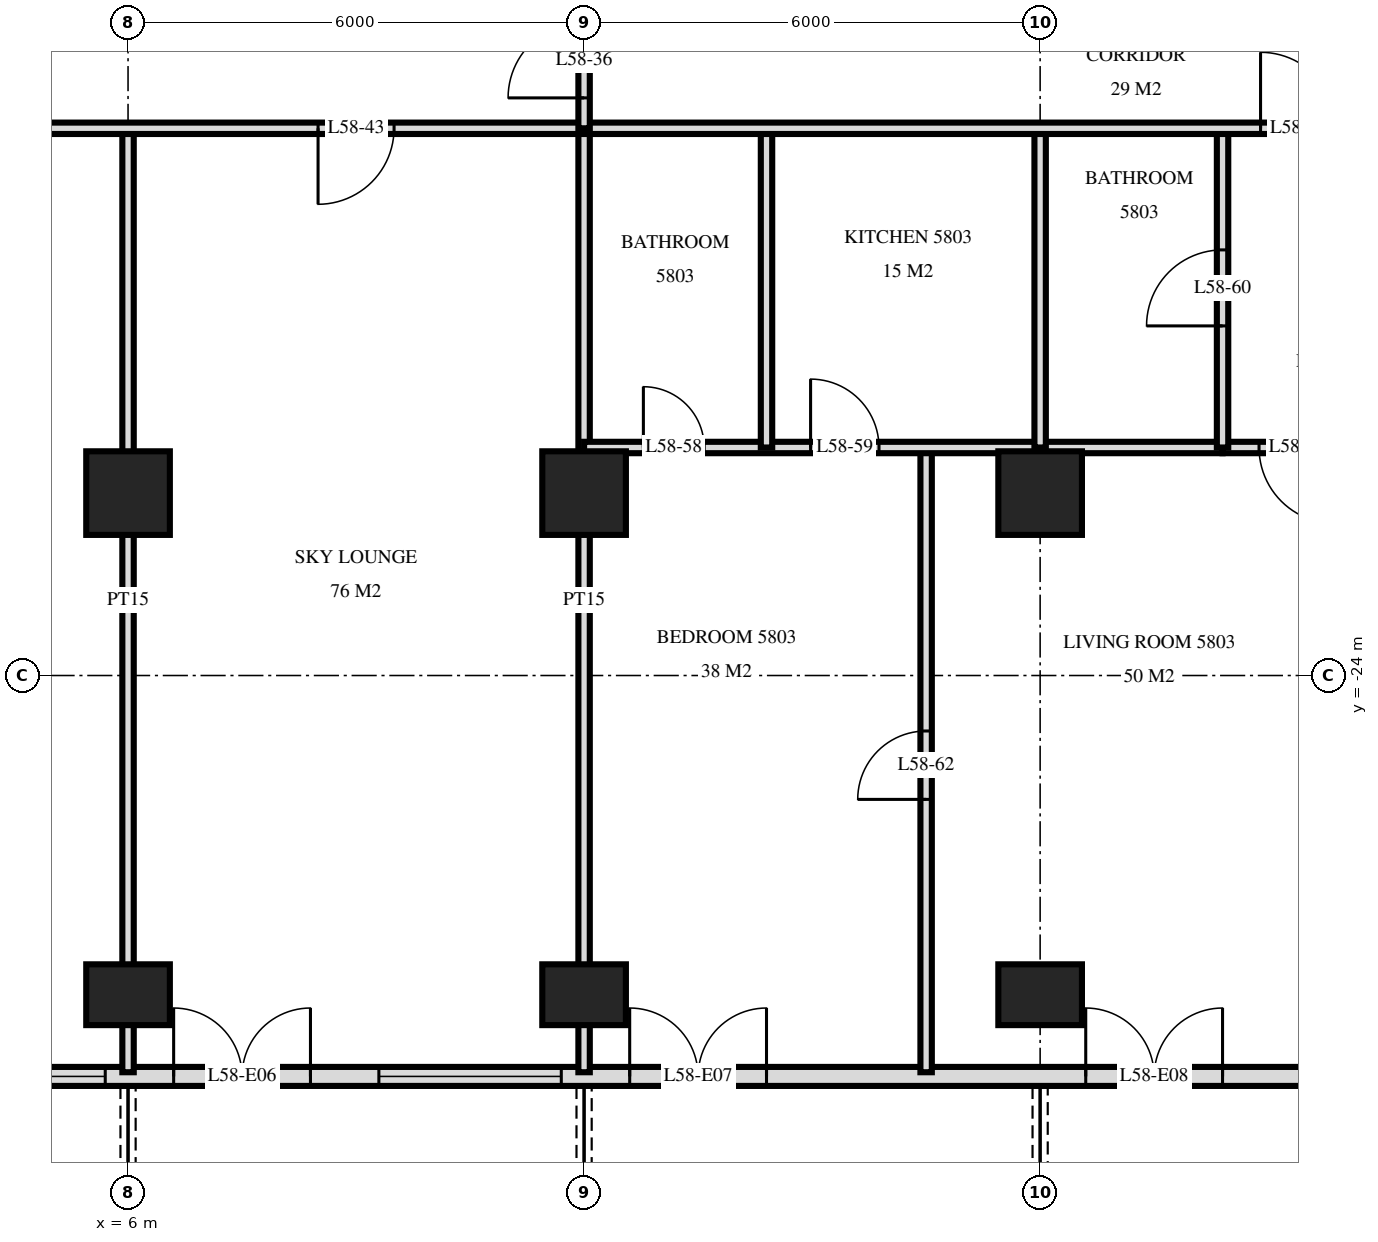
"""IFC4 building model, lengths in metres.
Left out: names, types, materials, properties, quantities, classifications, styles, units other than length and angle.
Written with IfcOpenShell. Run it as: python <this file> out.ifc"""

import sys

from ifc_helpers import new_model, si_unit, direction, frame, frame_2d, origin, origin_2d, place, context, subcontext, project, spatial, rectangle, extrude, element, fill, save


model = new_model("IFC4")
c1 = context("Model", 3, precision=1e-05, world=origin(), true_north=direction((0.0, 1.0)))
c2 = subcontext(c1, "Body", "Model", "MODEL_VIEW")
j1 = project(units=[si_unit("LENGTHUNIT", "METRE"), si_unit("PLANEANGLEUNIT", "RADIAN")], contexts=[c1])
p1 = place(None, origin())
s1 = spatial("IfcSite", under=j1, at=p1, CompositionType="ELEMENT")
p2 = place(p1, origin())
s2 = spatial("IfcBuilding", under=s1, at=p2, CompositionType="ELEMENT")
p3 = place(p2, frame((0.0, 0.0, 222.1)))
s3 = spatial("IfcBuildingStorey", under=s2, at=p3, CompositionType="ELEMENT", Elevation=222.1)
p4 = place(p3, frame((6.0, -28.2, 0.0), z_axis=(0.0, 0.0, 1.0), x_axis=(1.0, 0.0, 0.0)))
e1 = element("IfcColumn", 1, at=p4, inside=s3, PredefinedType="COLUMN", context=c2, shape_type="SweptSolid", body=[
    extrude(rectangle(XDim=1.1, YDim=0.8, at=origin_2d()), origin(), (0.0, 0.0, 1.0), 3.5),
])
p5 = place(p3, frame((6.0, -21.6, 0.0), z_axis=(0.0, 0.0, 1.0), x_axis=(1.0, 0.0, 0.0)))
e2 = element("IfcColumn", 2, at=p5, inside=s3, PredefinedType="COLUMN", context=c2, shape_type="SweptSolid", body=[
    extrude(rectangle(XDim=1.1, YDim=1.1, at=origin_2d()), origin(), (0.0, 0.0, 1.0), 3.5),
])
p6 = place(p3, frame((12.0, -28.2, 0.0), z_axis=(0.0, 0.0, 1.0), x_axis=(1.0, 0.0, 0.0)))
e3 = element("IfcColumn", 3, at=p6, inside=s3, PredefinedType="COLUMN", context=c2, shape_type="SweptSolid", body=[
    extrude(rectangle(XDim=1.1, YDim=0.8, at=origin_2d()), origin(), (0.0, 0.0, 1.0), 3.5),
])
p7 = place(p3, frame((12.0, -21.6, 0.0), z_axis=(0.0, 0.0, 1.0), x_axis=(1.0, 0.0, 0.0)))
e4 = element("IfcColumn", 4, at=p7, inside=s3, PredefinedType="COLUMN", context=c2, shape_type="SweptSolid", body=[
    extrude(rectangle(XDim=1.1, YDim=1.1, at=origin_2d()), origin(), (0.0, 0.0, 1.0), 3.5),
])
p8 = place(p3, frame((18.0, -28.2, 0.0), z_axis=(0.0, 0.0, 1.0), x_axis=(1.0, 0.0, 0.0)))
e5 = element("IfcColumn", 5, at=p8, inside=s3, PredefinedType="COLUMN", context=c2, shape_type="SweptSolid", body=[
    extrude(rectangle(XDim=1.1, YDim=0.8, at=origin_2d()), origin(), (0.0, 0.0, 1.0), 3.5),
])
p9 = place(p3, frame((18.0, -21.6, 0.0), z_axis=(0.0, 0.0, 1.0), x_axis=(1.0, 0.0, 0.0)))
e6 = element("IfcColumn", 6, at=p9, inside=s3, PredefinedType="COLUMN", context=c2, shape_type="SweptSolid", body=[
    extrude(rectangle(XDim=1.1, YDim=1.1, at=origin_2d()), origin(), (0.0, 0.0, 1.0), 3.5),
])
p10 = place(p3, frame((-22.475, -29.275, 0.0), z_axis=(0.0, 0.0, 1.0), x_axis=(1.0, 0.0, 0.0)))
e7 = element("IfcWall", 7, at=p10, inside=s3, PredefinedType="SOLIDWALL", context=c2, shape_type="SweptSolid", body=[
    extrude(rectangle(XDim=44.951, YDim=0.25, at=frame_2d((22.475, 0.0))), origin(), (0.0, 0.0, 1.0), 3.22),
])
p11 = place(p10, frame((0.575, 0.0, 0.0)))
e8 = element("IfcOpeningElement", 8, at=p11, cuts=e7, PredefinedType="OPENING", context=c2, shape_type="SweptSolid", body=[
    extrude(rectangle(XDim=1.8, YDim=2.4, at=frame_2d((0.9, 1.2))), frame((0.0, 0.135, 0.0), z_axis=(0.0, -1.0, 0.0), x_axis=(1.0, 0.0, 0.0)), (0.0, 0.0, 1.0), 0.27),
])
p12 = place(p10, frame((4.775, 0.0, 0.9)))
e9 = element("IfcOpeningElement", 9, at=p12, cuts=e7, PredefinedType="OPENING", context=c2, shape_type="SweptSolid", body=[
    extrude(rectangle(XDim=2.4, YDim=1.5, at=frame_2d((1.2, 0.75))), frame((0.0, 0.135, 0.0), z_axis=(0.0, -1.0, 0.0), x_axis=(1.0, 0.0, 0.0)), (0.0, 0.0, 1.0), 0.27),
])
p13 = place(p10, frame((8.075, 0.0, 0.0)))
e10 = element("IfcOpeningElement", 10, at=p13, cuts=e7, PredefinedType="OPENING", context=c2, shape_type="SweptSolid", body=[
    extrude(rectangle(XDim=1.8, YDim=2.4, at=frame_2d((0.9, 1.2))), frame((0.0, 0.135, 0.0), z_axis=(0.0, -1.0, 0.0), x_axis=(1.0, 0.0, 0.0)), (0.0, 0.0, 1.0), 0.27),
])
p14 = place(p10, frame((11.075, 0.0, 0.0)))
e11 = element("IfcOpeningElement", 11, at=p14, cuts=e7, PredefinedType="OPENING", context=c2, shape_type="SweptSolid", body=[
    extrude(rectangle(XDim=1.8, YDim=2.4, at=frame_2d((0.9, 1.2))), frame((0.0, 0.135, 0.0), z_axis=(0.0, -1.0, 0.0), x_axis=(1.0, 0.0, 0.0)), (0.0, 0.0, 1.0), 0.27),
])
p15 = place(p10, frame((13.775, 0.0, 0.9)))
e12 = element("IfcOpeningElement", 12, at=p15, cuts=e7, PredefinedType="OPENING", context=c2, shape_type="SweptSolid", body=[
    extrude(rectangle(XDim=2.4, YDim=1.5, at=frame_2d((1.2, 0.75))), frame((0.0, 0.135, 0.0), z_axis=(0.0, -1.0, 0.0), x_axis=(1.0, 0.0, 0.0)), (0.0, 0.0, 1.0), 0.27),
])
p16 = place(p10, frame((16.775, 0.0, 0.9)))
e13 = element("IfcOpeningElement", 13, at=p16, cuts=e7, PredefinedType="OPENING", context=c2, shape_type="SweptSolid", body=[
    extrude(rectangle(XDim=2.4, YDim=1.5, at=frame_2d((1.2, 0.75))), frame((0.0, 0.135, 0.0), z_axis=(0.0, -1.0, 0.0), x_axis=(1.0, 0.0, 0.0)), (0.0, 0.0, 1.0), 0.27),
])
p17 = place(p10, frame((20.075, 0.0, 0.0)))
e14 = element("IfcOpeningElement", 14, at=p17, cuts=e7, PredefinedType="OPENING", context=c2, shape_type="SweptSolid", body=[
    extrude(rectangle(XDim=1.8, YDim=2.4, at=frame_2d((0.9, 1.2))), frame((0.0, 0.135, 0.0), z_axis=(0.0, -1.0, 0.0), x_axis=(1.0, 0.0, 0.0)), (0.0, 0.0, 1.0), 0.27),
])
p18 = place(p10, frame((23.075, 0.0, 0.0)))
e15 = element("IfcOpeningElement", 15, at=p18, cuts=e7, PredefinedType="OPENING", context=c2, shape_type="SweptSolid", body=[
    extrude(rectangle(XDim=1.8, YDim=2.4, at=frame_2d((0.9, 1.2))), frame((0.0, 0.135, 0.0), z_axis=(0.0, -1.0, 0.0), x_axis=(1.0, 0.0, 0.0)), (0.0, 0.0, 1.0), 0.27),
])
p19 = place(p10, frame((25.775, 0.0, 0.9)))
e16 = element("IfcOpeningElement", 16, at=p19, cuts=e7, PredefinedType="OPENING", context=c2, shape_type="SweptSolid", body=[
    extrude(rectangle(XDim=2.4, YDim=1.5, at=frame_2d((1.2, 0.75))), frame((0.0, 0.135, 0.0), z_axis=(0.0, -1.0, 0.0), x_axis=(1.0, 0.0, 0.0)), (0.0, 0.0, 1.0), 0.27),
])
p20 = place(p10, frame((29.075, 0.0, 0.0)))
e17 = element("IfcOpeningElement", 17, at=p20, cuts=e7, PredefinedType="OPENING", context=c2, shape_type="SweptSolid", body=[
    extrude(rectangle(XDim=1.8, YDim=2.4, at=frame_2d((0.9, 1.2))), frame((0.0, 0.135, 0.0), z_axis=(0.0, -1.0, 0.0), x_axis=(1.0, 0.0, 0.0)), (0.0, 0.0, 1.0), 0.27),
])
p21 = place(p10, frame((31.775, 0.0, 0.9)))
e18 = element("IfcOpeningElement", 18, at=p21, cuts=e7, PredefinedType="OPENING", context=c2, shape_type="SweptSolid", body=[
    extrude(rectangle(XDim=2.4, YDim=1.5, at=frame_2d((1.2, 0.75))), frame((0.0, 0.135, 0.0), z_axis=(0.0, -1.0, 0.0), x_axis=(1.0, 0.0, 0.0)), (0.0, 0.0, 1.0), 0.27),
])
p22 = place(p10, frame((35.075, 0.0, 0.0)))
e19 = element("IfcOpeningElement", 19, at=p22, cuts=e7, PredefinedType="OPENING", context=c2, shape_type="SweptSolid", body=[
    extrude(rectangle(XDim=1.8, YDim=2.4, at=frame_2d((0.9, 1.2))), frame((0.0, 0.135, 0.0), z_axis=(0.0, -1.0, 0.0), x_axis=(1.0, 0.0, 0.0)), (0.0, 0.0, 1.0), 0.27),
])
p23 = place(p10, frame((41.075, 0.0, 0.0)))
e20 = element("IfcOpeningElement", 20, at=p23, cuts=e7, PredefinedType="OPENING", context=c2, shape_type="SweptSolid", body=[
    extrude(rectangle(XDim=1.8, YDim=2.4, at=frame_2d((0.9, 1.2))), frame((0.0, 0.135, 0.0), z_axis=(0.0, -1.0, 0.0), x_axis=(1.0, 0.0, 0.0)), (0.0, 0.0, 1.0), 0.27),
])
p24 = place(p3, frame((20.4, -21.0, 0.0), z_axis=(0.0, 0.0, 1.0), x_axis=(0.0, 1.0, 0.0)))
e21 = element("IfcWall", 21, at=p24, inside=s3, PredefinedType="PARTITIONING", context=c2, shape_type="SweptSolid", body=[
    extrude(rectangle(XDim=4.2, YDim=0.15, at=frame_2d((2.1, 0.0))), origin(), (0.0, 0.0, 1.0), 3.22),
])
p25 = place(p24, frame((1.6, 0.0, 0.0)))
e22 = element("IfcOpeningElement", 22, at=p25, cuts=e21, PredefinedType="OPENING", context=c2, shape_type="SweptSolid", body=[
    extrude(rectangle(XDim=1.0, YDim=2.1, at=frame_2d((0.5, 1.05))), frame((0.0, 0.085, 0.0), z_axis=(0.0, -1.0, 0.0), x_axis=(1.0, 0.0, 0.0)), (0.0, 0.0, 1.0), 0.17),
])
p26 = place(p3, frame((18.0, -21.0, 0.0), z_axis=(0.0, 0.0, 1.0), x_axis=(0.0, 1.0, 0.0)))
e23 = element("IfcWall", 23, at=p26, inside=s3, PredefinedType="PARTITIONING", context=c2, shape_type="SweptSolid", body=[
    extrude(rectangle(XDim=4.2, YDim=0.15, at=frame_2d((2.1, 0.0))), origin(), (0.0, 0.0, 1.0), 3.22),
])
p27 = place(p3, frame((16.5, -29.22, 0.0), z_axis=(0.0, 0.0, 1.0), x_axis=(0.0, 1.0, 0.0)))
e24 = element("IfcWall", 24, at=p27, inside=s3, PredefinedType="PARTITIONING", context=c2, shape_type="SweptSolid", body=[
    extrude(rectangle(XDim=8.22, YDim=0.15, at=frame_2d((4.11, 0.0))), origin(), (0.0, 0.0, 1.0), 3.22),
])
p28 = place(p27, frame((3.59, 0.0, 0.0)))
e25 = element("IfcOpeningElement", 25, at=p28, cuts=e24, PredefinedType="OPENING", context=c2, shape_type="SweptSolid", body=[
    extrude(rectangle(XDim=0.9, YDim=2.1, at=frame_2d((0.45, 1.05))), frame((0.0, 0.085, 0.0), z_axis=(0.0, -1.0, 0.0), x_axis=(1.0, 0.0, 0.0)), (0.0, 0.0, 1.0), 0.17),
])
p29 = place(p3, frame((14.4, -21.0, 0.0), z_axis=(0.0, 0.0, 1.0), x_axis=(0.0, 1.0, 0.0)))
e26 = element("IfcWall", 26, at=p29, inside=s3, PredefinedType="PARTITIONING", context=c2, shape_type="SweptSolid", body=[
    extrude(rectangle(XDim=4.2, YDim=0.15, at=frame_2d((2.1, 0.0))), origin(), (0.0, 0.0, 1.0), 3.22),
])
p30 = place(p3, frame((12.0, -16.8, 0.0), z_axis=(0.0, 0.0, 1.0), x_axis=(0.0, 1.0, 0.0)))
e27 = element("IfcWall", 27, at=p30, inside=s3, PredefinedType="PARTITIONING", context=c2, shape_type="SweptSolid", body=[
    extrude(rectangle(XDim=1.75, YDim=0.15, at=frame_2d((0.875, 0.0))), origin(), (0.0, 0.0, 1.0), 3.22),
])
p31 = place(p30, frame((0.4, 0.0, 0.0)))
e28 = element("IfcOpeningElement", 28, at=p31, cuts=e27, PredefinedType="OPENING", context=c2, shape_type="SweptSolid", body=[
    extrude(rectangle(XDim=1.0, YDim=2.1, at=frame_2d((0.5, 1.05))), frame((0.0, 0.085, 0.0), z_axis=(0.0, -1.0, 0.0), x_axis=(1.0, 0.0, 0.0)), (0.0, 0.0, 1.0), 0.17),
])
for number, where, z_axis, x_axis in (
    (29, (12.0, -29.22, 0.0), (0.0, 0.0, 1.0), (0.0, 1.0, 0.0)),
    (30, (6.0, -29.22, 0.0), (0.0, 0.0, 1.0), (0.0, 1.0, 0.0)),
):
    element("IfcWall", number, at=place(p3, frame(where, z_axis=z_axis, x_axis=x_axis)), inside=s3, PredefinedType="PARTITIONING", context=c2, shape_type="SweptSolid", body=[
        extrude(rectangle(XDim=12.42, YDim=0.15, at=frame_2d((6.21, 0.0))), origin(), (0.0, 0.0, 1.0), 3.22),
    ])
p32 = place(p3, frame((20.4, -21.0, 0.0), z_axis=(0.0, 0.0, 1.0), x_axis=(1.0, 0.0, 0.0)))
e31 = element("IfcWall", 31, at=p32, inside=s3, PredefinedType="PARTITIONING", context=c2, shape_type="SweptSolid", body=[
    extrude(rectangle(XDim=2.0, YDim=0.15, at=frame_2d((1.0, 0.0))), origin(), (0.0, 0.0, 1.0), 3.22),
])
p33 = place(p32, frame((0.48, 0.0, 0.0)))
e32 = element("IfcOpeningElement", 32, at=p33, cuts=e31, PredefinedType="OPENING", context=c2, shape_type="SweptSolid", body=[
    extrude(rectangle(XDim=1.0, YDim=2.1, at=frame_2d((0.5, 1.05))), frame((0.0, 0.085, 0.0), z_axis=(0.0, -1.0, 0.0), x_axis=(1.0, 0.0, 0.0)), (0.0, 0.0, 1.0), 0.17),
])
p34 = place(p3, frame((12.0, -21.0, 0.0), z_axis=(0.0, 0.0, 1.0), x_axis=(1.0, 0.0, 0.0)))
e33 = element("IfcWall", 33, at=p34, inside=s3, PredefinedType="PARTITIONING", context=c2, shape_type="SweptSolid", body=[
    extrude(rectangle(XDim=8.4, YDim=0.15, at=frame_2d((4.2, 0.0))), origin(), (0.0, 0.0, 1.0), 3.22),
])
p35 = place(p34, frame((0.78, 0.0, 0.0)))
e34 = element("IfcOpeningElement", 34, at=p35, cuts=e33, PredefinedType="OPENING", context=c2, shape_type="SweptSolid", body=[
    extrude(rectangle(XDim=0.8, YDim=2.1, at=frame_2d((0.4, 1.05))), frame((0.0, 0.085, 0.0), z_axis=(0.0, -1.0, 0.0), x_axis=(1.0, 0.0, 0.0)), (0.0, 0.0, 1.0), 0.17),
])
p36 = place(p34, frame((2.98, 0.0, 0.0)))
e35 = element("IfcOpeningElement", 35, at=p36, cuts=e33, PredefinedType="OPENING", context=c2, shape_type="SweptSolid", body=[
    extrude(rectangle(XDim=0.9, YDim=2.1, at=frame_2d((0.45, 1.05))), frame((0.0, 0.085, 0.0), z_axis=(0.0, -1.0, 0.0), x_axis=(1.0, 0.0, 0.0)), (0.0, 0.0, 1.0), 0.17),
])
p37 = place(p3, frame((-26.82, -16.8, 0.0), z_axis=(0.0, 0.0, 1.0), x_axis=(1.0, 0.0, 0.0)))
e36 = element("IfcWall", 36, at=p37, inside=s3, PredefinedType="PARTITIONING", context=c2, shape_type="SweptSolid", body=[
    extrude(rectangle(XDim=53.64, YDim=0.15, at=frame_2d((26.82, 0.0))), origin(), (0.0, 0.0, 1.0), 3.22),
])
p38 = place(p37, frame((11.17, 0.0, 0.0)))
e37 = element("IfcOpeningElement", 37, at=p38, cuts=e36, PredefinedType="OPENING", context=c2, shape_type="SweptSolid", body=[
    extrude(rectangle(XDim=1.0, YDim=2.1, at=frame_2d((0.5, 1.05))), frame((0.0, 0.085, 0.0), z_axis=(0.0, -1.0, 0.0), x_axis=(1.0, 0.0, 0.0)), (0.0, 0.0, 1.0), 0.17),
])
p39 = place(p37, frame((3.22, 0.0, 0.0)))
e38 = element("IfcOpeningElement", 38, at=p39, cuts=e36, PredefinedType="OPENING", context=c2, shape_type="SweptSolid", body=[
    extrude(rectangle(XDim=1.0, YDim=2.1, at=frame_2d((0.5, 1.05))), frame((0.0, 0.085, 0.0), z_axis=(0.0, -1.0, 0.0), x_axis=(1.0, 0.0, 0.0)), (0.0, 0.0, 1.0), 0.17),
])
p40 = place(p37, frame((5.02, 0.0, 0.0)))
e39 = element("IfcOpeningElement", 39, at=p40, cuts=e36, PredefinedType="OPENING", context=c2, shape_type="SweptSolid", body=[
    extrude(rectangle(XDim=1.0, YDim=2.1, at=frame_2d((0.5, 1.05))), frame((0.0, 0.085, 0.0), z_axis=(0.0, -1.0, 0.0), x_axis=(1.0, 0.0, 0.0)), (0.0, 0.0, 1.0), 0.17),
])
p41 = place(p37, frame((47.72, 0.0, 0.0)))
e40 = element("IfcOpeningElement", 40, at=p41, cuts=e36, PredefinedType="OPENING", context=c2, shape_type="SweptSolid", body=[
    extrude(rectangle(XDim=1.0, YDim=2.1, at=frame_2d((0.5, 1.05))), frame((0.0, 0.085, 0.0), z_axis=(0.0, -1.0, 0.0), x_axis=(1.0, 0.0, 0.0)), (0.0, 0.0, 1.0), 0.17),
])
p42 = place(p37, frame((51.04, 0.0, 0.0)))
e41 = element("IfcOpeningElement", 41, at=p42, cuts=e36, PredefinedType="OPENING", context=c2, shape_type="SweptSolid", body=[
    extrude(rectangle(XDim=1.0, YDim=2.1, at=frame_2d((0.5, 1.05))), frame((0.0, 0.085, 0.0), z_axis=(0.0, -1.0, 0.0), x_axis=(1.0, 0.0, 0.0)), (0.0, 0.0, 1.0), 0.17),
])
p43 = place(p37, frame((17.32, 0.0, 0.0)))
e42 = element("IfcOpeningElement", 42, at=p43, cuts=e36, PredefinedType="OPENING", context=c2, shape_type="SweptSolid", body=[
    extrude(rectangle(XDim=1.0, YDim=2.1, at=frame_2d((0.5, 1.05))), frame((0.0, 0.085, 0.0), z_axis=(0.0, -1.0, 0.0), x_axis=(1.0, 0.0, 0.0)), (0.0, 0.0, 1.0), 0.17),
])
p44 = place(p37, frame((26.32, 0.0, 0.0)))
e43 = element("IfcOpeningElement", 43, at=p44, cuts=e36, PredefinedType="OPENING", context=c2, shape_type="SweptSolid", body=[
    extrude(rectangle(XDim=1.0, YDim=2.1, at=frame_2d((0.5, 1.05))), frame((0.0, 0.085, 0.0), z_axis=(0.0, -1.0, 0.0), x_axis=(1.0, 0.0, 0.0)), (0.0, 0.0, 1.0), 0.17),
])
p45 = place(p37, frame((35.32, 0.0, 0.0)))
e44 = element("IfcOpeningElement", 44, at=p45, cuts=e36, PredefinedType="OPENING", context=c2, shape_type="SweptSolid", body=[
    extrude(rectangle(XDim=1.0, YDim=2.1, at=frame_2d((0.5, 1.05))), frame((0.0, 0.085, 0.0), z_axis=(0.0, -1.0, 0.0), x_axis=(1.0, 0.0, 0.0)), (0.0, 0.0, 1.0), 0.17),
])
p46 = place(p19, origin())
e45 = element("IfcWindow", 45, at=p46, inside=s3, PartitioningType="SINGLE_PANEL", PredefinedType="WINDOW", context=c2, shape_type="SweptSolid", body=[
    extrude(rectangle(XDim=2.4, YDim=1.5, at=frame_2d((1.2, 0.75))), frame((0.0, 0.03, 0.0), z_axis=(0.0, -1.0, 0.0), x_axis=(1.0, 0.0, 0.0)), (0.0, 0.0, 1.0), 0.06),
])
fill(e16, e45)
p47 = place(p20, origin())
e46 = element("IfcDoor", 46, at=p47, inside=s3, OperationType="DOUBLE_DOOR_SINGLE_SWING", PredefinedType="DOOR", context=c2, shape_type="SweptSolid", body=[
    extrude(rectangle(XDim=1.8, YDim=2.4, at=frame_2d((0.9, 1.2))), frame((0.0, 0.025, 0.0), z_axis=(0.0, -1.0, 0.0), x_axis=(1.0, 0.0, 0.0)), (0.0, 0.0, 1.0), 0.05),
])
fill(e17, e46)
p48 = place(p21, origin())
e47 = element("IfcWindow", 47, at=p48, inside=s3, PartitioningType="SINGLE_PANEL", PredefinedType="WINDOW", context=c2, shape_type="SweptSolid", body=[
    extrude(rectangle(XDim=2.4, YDim=1.5, at=frame_2d((1.2, 0.75))), frame((0.0, 0.03, 0.0), z_axis=(0.0, -1.0, 0.0), x_axis=(1.0, 0.0, 0.0)), (0.0, 0.0, 1.0), 0.06),
])
fill(e18, e47)
p49 = place(p22, origin())
e48 = element("IfcDoor", 48, at=p49, inside=s3, OperationType="DOUBLE_DOOR_SINGLE_SWING", PredefinedType="DOOR", context=c2, shape_type="SweptSolid", body=[
    extrude(rectangle(XDim=1.8, YDim=2.4, at=frame_2d((0.9, 1.2))), frame((0.0, 0.025, 0.0), z_axis=(0.0, -1.0, 0.0), x_axis=(1.0, 0.0, 0.0)), (0.0, 0.0, 1.0), 0.05),
])
fill(e19, e48)
p50 = place(p23, origin())
e49 = element("IfcDoor", 49, at=p50, inside=s3, OperationType="DOUBLE_DOOR_SINGLE_SWING", PredefinedType="DOOR", context=c2, shape_type="SweptSolid", body=[
    extrude(rectangle(XDim=1.8, YDim=2.4, at=frame_2d((0.9, 1.2))), frame((0.0, 0.025, 0.0), z_axis=(0.0, -1.0, 0.0), x_axis=(1.0, 0.0, 0.0)), (0.0, 0.0, 1.0), 0.05),
])
fill(e20, e49)
p51 = place(p31, origin())
e50 = element("IfcDoor", 50, at=p51, inside=s3, OperationType="SINGLE_SWING_RIGHT", PredefinedType="DOOR", context=c2, shape_type="SweptSolid", body=[
    extrude(rectangle(XDim=1.0, YDim=2.1, at=frame_2d((0.5, 1.05))), frame((0.0, 0.025, 0.0), z_axis=(0.0, -1.0, 0.0), x_axis=(1.0, 0.0, 0.0)), (0.0, 0.0, 1.0), 0.05),
])
fill(e28, e50)
p52 = place(p41, origin())
e51 = element("IfcDoor", 51, at=p52, inside=s3, OperationType="SINGLE_SWING_RIGHT", PredefinedType="DOOR", context=c2, shape_type="SweptSolid", body=[
    extrude(rectangle(XDim=1.0, YDim=2.1, at=frame_2d((0.5, 1.05))), frame((0.0, 0.025, 0.0), z_axis=(0.0, -1.0, 0.0), x_axis=(1.0, 0.0, 0.0)), (0.0, 0.0, 1.0), 0.05),
])
fill(e40, e51)
p53 = place(p45, frame((0.5, 0.0, 0.0), z_axis=(0.0, 0.0, 1.0), x_axis=(-1.0, 0.0, 0.0)))
e52 = element("IfcDoor", 52, at=p53, inside=s3, OperationType="SINGLE_SWING_LEFT", PredefinedType="DOOR", context=c2, shape_type="SweptSolid", body=[
    extrude(rectangle(XDim=1.0, YDim=2.1, at=frame_2d((0.0, 1.05))), frame((0.0, -0.025, 0.0), z_axis=(0.0, 1.0, 0.0), x_axis=(-1.0, 0.0, 0.0)), (0.0, 0.0, 1.0), 0.05),
])
fill(e44, e52)
p54 = place(p35, origin())
e53 = element("IfcDoor", 53, at=p54, inside=s3, OperationType="SINGLE_SWING_RIGHT", PredefinedType="DOOR", context=c2, shape_type="SweptSolid", body=[
    extrude(rectangle(XDim=0.8, YDim=2.1, at=frame_2d((0.4, 1.05))), frame((0.0, 0.025, 0.0), z_axis=(0.0, -1.0, 0.0), x_axis=(1.0, 0.0, 0.0)), (0.0, 0.0, 1.0), 0.05),
])
fill(e34, e53)
p55 = place(p36, origin())
e54 = element("IfcDoor", 54, at=p55, inside=s3, OperationType="SINGLE_SWING_RIGHT", PredefinedType="DOOR", context=c2, shape_type="SweptSolid", body=[
    extrude(rectangle(XDim=0.9, YDim=2.1, at=frame_2d((0.45, 1.05))), frame((0.0, 0.025, 0.0), z_axis=(0.0, -1.0, 0.0), x_axis=(1.0, 0.0, 0.0)), (0.0, 0.0, 1.0), 0.05),
])
fill(e35, e54)
p56 = place(p25, origin())
e55 = element("IfcDoor", 55, at=p56, inside=s3, OperationType="SINGLE_SWING_RIGHT", PredefinedType="DOOR", context=c2, shape_type="SweptSolid", body=[
    extrude(rectangle(XDim=1.0, YDim=2.1, at=frame_2d((0.5, 1.05))), frame((0.0, 0.025, 0.0), z_axis=(0.0, -1.0, 0.0), x_axis=(1.0, 0.0, 0.0)), (0.0, 0.0, 1.0), 0.05),
])
fill(e22, e55)
p57 = place(p33, frame((0.5, 0.0, 0.0), z_axis=(0.0, 0.0, 1.0), x_axis=(-1.0, 0.0, 0.0)))
e56 = element("IfcDoor", 56, at=p57, inside=s3, OperationType="SINGLE_SWING_RIGHT", PredefinedType="DOOR", context=c2, shape_type="SweptSolid", body=[
    extrude(rectangle(XDim=1.0, YDim=2.1, at=frame_2d((0.0, 1.05))), frame((0.0, -0.025, 0.0), z_axis=(0.0, 1.0, 0.0), x_axis=(-1.0, 0.0, 0.0)), (0.0, 0.0, 1.0), 0.05),
])
fill(e32, e56)
p58 = place(p28, origin())
e57 = element("IfcDoor", 57, at=p58, inside=s3, OperationType="SINGLE_SWING_RIGHT", PredefinedType="DOOR", context=c2, shape_type="SweptSolid", body=[
    extrude(rectangle(XDim=0.9, YDim=2.1, at=frame_2d((0.45, 1.05))), frame((0.0, 0.025, 0.0), z_axis=(0.0, -1.0, 0.0), x_axis=(1.0, 0.0, 0.0)), (0.0, 0.0, 1.0), 0.05),
])
fill(e25, e57)
save(model, sys.argv[1])
